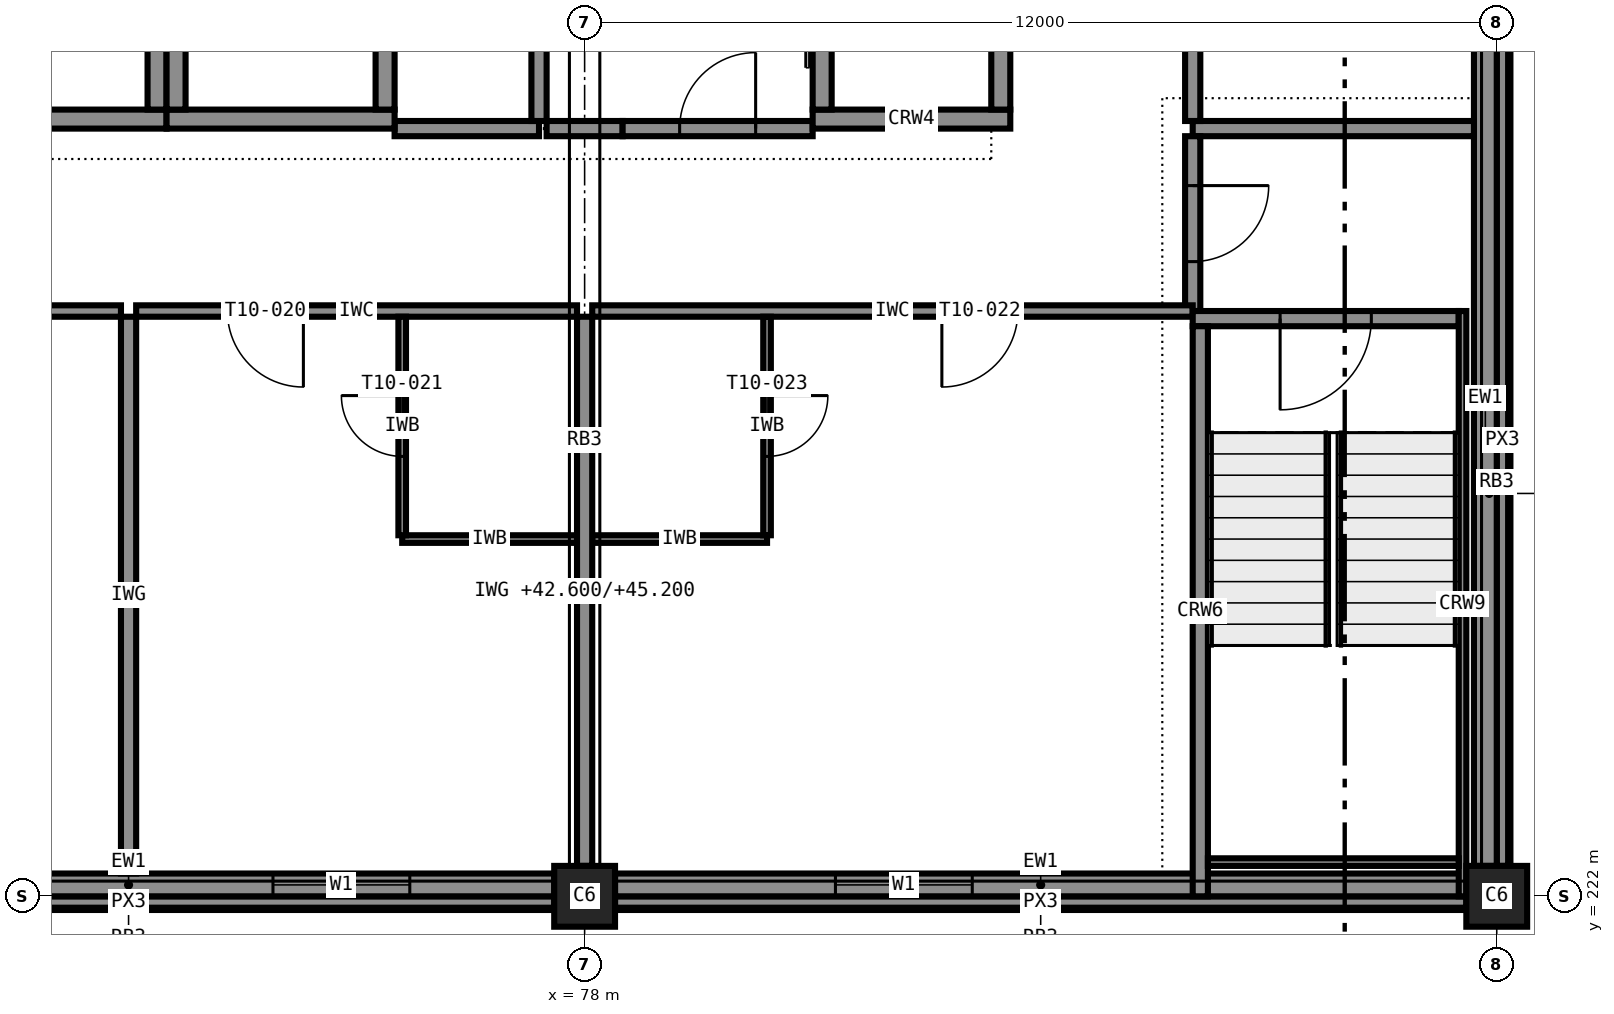
"""IFC4 building model, lengths in metres.
Left out: names, types, materials, properties, quantities, classifications, styles, units other than length and angle.
Written with IfcOpenShell. Run it as: python <this file> out.ifc"""

import sys

from ifc_helpers import new_model, si_unit, direction, frame, frame_2d, origin, origin_2d, place, context, subcontext, project, spatial, rectangle, extrude, element, fill, save


model = new_model("IFC4")
c1 = context("Model", 3, precision=1e-05, world=origin(), true_north=direction((0.0, 1.0)))
c2 = subcontext(c1, "Body", "Model", "MODEL_VIEW")
j1 = project(units=[si_unit("LENGTHUNIT", "METRE"), si_unit("PLANEANGLEUNIT", "RADIAN")], contexts=[c1])
p1 = place(None, origin())
s1 = spatial("IfcSite", under=j1, at=p1, CompositionType="ELEMENT")
p2 = place(p1, origin())
s2 = spatial("IfcBuilding", under=s1, at=p2, CompositionType="ELEMENT")
p3 = place(p2, frame((0.0, 0.0, 42.6)))
s3 = spatial("IfcBuildingStorey", under=s2, at=p3, CompositionType="ELEMENT", Elevation=42.6)
for number, where, z_axis, x_axis in (
    (1, (78.0, 222.0, 0.0), (0.0, 0.0, 1.0), (1.0, 0.0, 0.0)),
    (2, (90.0, 222.0, 0.0), (0.0, 0.0, 1.0), (1.0, 0.0, 0.0)),
):
    element("IfcColumn", number, at=place(p3, frame(where, z_axis=z_axis, x_axis=x_axis)), inside=s3, PredefinedType="COLUMN", context=c2, shape_type="SweptSolid", body=[
        extrude(rectangle(XDim=0.8, YDim=0.8, at=origin_2d()), origin(), (0.0, 0.0, 1.0), 3.6),
    ])
p4 = place(p3, frame((69.5, 232.225, 0.0), z_axis=(0.0, 0.0, 1.0), x_axis=(1.0, 0.0, 0.0)))
e3 = element("IfcWall", 3, at=p4, inside=s3, PredefinedType="SHEAR", context=c2, shape_type="SweptSolid", body=[
    extrude(rectangle(XDim=3.0, YDim=0.25, at=frame_2d((1.5, 0.0))), origin(), (0.0, 0.0, 1.0), 3.6),
])
p5 = place(p3, frame((72.375, 232.35, 0.0), z_axis=(0.0, 0.0, 1.0), x_axis=(0.0, 1.0, 0.0)))
e4 = element("IfcWall", 4, at=p5, inside=s3, PredefinedType="SHEAR", context=c2, shape_type="SweptSolid", body=[
    extrude(rectangle(XDim=3.3, YDim=0.25, at=frame_2d((1.65, 0.0))), origin(), (0.0, 0.0, 1.0), 3.6),
])
p6 = place(p3, frame((72.5, 232.225, 0.0), z_axis=(0.0, 0.0, 1.0), x_axis=(1.0, 0.0, 0.0)))
e5 = element("IfcWall", 5, at=p6, inside=s3, PredefinedType="SHEAR", context=c2, shape_type="SweptSolid", body=[
    extrude(rectangle(XDim=3.0, YDim=0.25, at=frame_2d((1.5, 0.0))), origin(), (0.0, 0.0, 1.0), 3.6),
])
for number, where, z_axis, x_axis in (
    (6, (72.625, 232.35, 0.0), (0.0, 0.0, 1.0), (0.0, 1.0, 0.0)),
    (7, (75.375, 232.35, 0.0), (0.0, 0.0, 1.0), (0.0, 1.0, 0.0)),
):
    element("IfcWall", number, at=place(p3, frame(where, z_axis=z_axis, x_axis=x_axis)), inside=s3, PredefinedType="SHEAR", context=c2, shape_type="SweptSolid", body=[
        extrude(rectangle(XDim=3.3, YDim=0.25, at=frame_2d((1.65, 0.0))), origin(), (0.0, 0.0, 1.0), 3.6),
    ])
p7 = place(p3, frame((81.0, 232.225, 0.0), z_axis=(0.0, 0.0, 1.0), x_axis=(1.0, 0.0, 0.0)))
e8 = element("IfcWall", 8, at=p7, inside=s3, PredefinedType="SHEAR", context=c2, shape_type="SweptSolid", body=[
    extrude(rectangle(XDim=2.6, YDim=0.25, at=frame_2d((1.3, 0.0))), origin(), (0.0, 0.0, 1.0), 3.6),
])
p8 = place(p3, frame((81.125, 232.35, 0.0), z_axis=(0.0, 0.0, 1.0), x_axis=(0.0, 1.0, 0.0)))
e9 = element("IfcWall", 9, at=p8, inside=s3, PredefinedType="SHEAR", context=c2, shape_type="SweptSolid", body=[
    extrude(rectangle(XDim=3.3, YDim=0.25, at=frame_2d((1.65, 0.0))), origin(), (0.0, 0.0, 1.0), 3.6),
])
p9 = place(p8, frame((1.1, 0.0, 0.0)))
e10 = element("IfcOpeningElement", 10, at=p9, cuts=e9, PredefinedType="OPENING", context=c2, shape_type="SweptSolid", body=[
    extrude(rectangle(XDim=1.1, YDim=2.1, at=frame_2d((0.55, 1.05))), frame((0.0, 0.135, 0.0), z_axis=(0.0, -1.0, 0.0), x_axis=(1.0, 0.0, 0.0)), (0.0, 0.0, 1.0), 0.27),
])
p10 = place(p3, frame((83.475, 232.35, 0.0), z_axis=(0.0, 0.0, 1.0), x_axis=(0.0, 1.0, 0.0)))
e11 = element("IfcWall", 11, at=p10, inside=s3, PredefinedType="SHEAR", context=c2, shape_type="SweptSolid", body=[
    extrude(rectangle(XDim=3.3, YDim=0.25, at=frame_2d((1.65, 0.0))), origin(), (0.0, 0.0, 1.0), 3.6),
])
p11 = place(p3, frame((89.5, 229.6, 0.0), z_axis=(0.0, 0.0, 1.0), x_axis=(-1.0, 0.0, 0.0)))
e12 = element("IfcWall", 12, at=p11, inside=s3, PredefinedType="SHEAR", context=c2, shape_type="SweptSolid", body=[
    extrude(rectangle(XDim=3.5, YDim=0.2, at=frame_2d((1.75, 0.0))), origin(), (0.0, 0.0, 1.0), 3.6),
])
p12 = place(p11, frame((1.15, 0.0, 0.0)))
e13 = element("IfcOpeningElement", 13, at=p12, cuts=e12, PredefinedType="OPENING", context=c2, shape_type="SweptSolid", body=[
    extrude(rectangle(XDim=1.2, YDim=2.1, at=frame_2d((0.6, 1.05))), frame((0.0, 0.11, 0.0), z_axis=(0.0, -1.0, 0.0), x_axis=(1.0, 0.0, 0.0)), (0.0, 0.0, 1.0), 0.22),
])
p13 = place(p3, frame((86.1, 222.0, 0.0), z_axis=(0.0, 0.0, 1.0), x_axis=(0.0, 1.0, 0.0)))
e14 = element("IfcWall", 14, at=p13, inside=s3, PredefinedType="SHEAR", context=c2, shape_type="SweptSolid", body=[
    extrude(rectangle(XDim=7.5, YDim=0.2, at=frame_2d((3.75, 0.0))), origin(), (0.0, 0.0, 1.0), 3.6),
])
p14 = place(p3, frame((89.55, 229.7, 0.0), z_axis=(0.0, 0.0, 1.0), x_axis=(0.0, -1.0, 0.0)))
e15 = element("IfcWall", 15, at=p14, inside=s3, PredefinedType="SHEAR", context=c2, shape_type="SweptSolid", body=[
    extrude(rectangle(XDim=7.7, YDim=0.1, at=frame_2d((3.85, 0.0))), origin(), (0.0, 0.0, 1.0), 3.4),
])
p15 = place(p3, frame((89.5, 222.45, 0.0), z_axis=(0.0, 0.0, 1.0), x_axis=(-1.0, 0.0, 0.0)))
e16 = element("IfcWall", 16, at=p15, inside=s3, PredefinedType="SHEAR", context=c2, shape_type="SweptSolid", body=[
    extrude(rectangle(XDim=3.3, YDim=0.1, at=frame_2d((1.65, 0.0))), origin(), (0.0, 0.0, 1.0), 3.4),
])
p16 = place(p3, frame((66.4, 222.15, 0.0), z_axis=(0.0, 0.0, 1.0), x_axis=(1.0, 0.0, 0.0)))
e17 = element("IfcWall", 17, at=p16, inside=s3, PredefinedType="STANDARD", context=c2, shape_type="SweptSolid", body=[
    extrude(rectangle(XDim=11.2, YDim=0.3, at=frame_2d((5.6, 0.0))), origin(), (0.0, 0.0, 1.0), 2.6),
])
p17 = place(p16, frame((1.9, 0.0, 0.85)))
e18 = element("IfcOpeningElement", 18, at=p17, cuts=e17, PredefinedType="OPENING", context=c2, shape_type="SweptSolid", body=[
    extrude(rectangle(XDim=1.8, YDim=1.75, at=frame_2d((0.9, 0.875))), frame((0.0, 0.16, 0.0), z_axis=(0.0, -1.0, 0.0), x_axis=(1.0, 0.0, 0.0)), (0.0, 0.0, 1.0), 0.32),
])
p18 = place(p16, frame((7.5, 0.0, 0.85)))
e19 = element("IfcOpeningElement", 19, at=p18, cuts=e17, PredefinedType="OPENING", context=c2, shape_type="SweptSolid", body=[
    extrude(rectangle(XDim=1.8, YDim=1.75, at=frame_2d((0.9, 0.875))), frame((0.0, 0.16, 0.0), z_axis=(0.0, -1.0, 0.0), x_axis=(1.0, 0.0, 0.0)), (0.0, 0.0, 1.0), 0.32),
])
p19 = place(p3, frame((78.4, 222.15, 0.0), z_axis=(0.0, 0.0, 1.0), x_axis=(1.0, 0.0, 0.0)))
e20 = element("IfcWall", 20, at=p19, inside=s3, PredefinedType="STANDARD", context=c2, shape_type="SweptSolid", body=[
    extrude(rectangle(XDim=11.2, YDim=0.3, at=frame_2d((5.6, 0.0))), origin(), (0.0, 0.0, 1.0), 2.6),
])
p20 = place(p19, frame((2.9, 0.0, 0.85)))
e21 = element("IfcOpeningElement", 21, at=p20, cuts=e20, PredefinedType="OPENING", context=c2, shape_type="SweptSolid", body=[
    extrude(rectangle(XDim=1.8, YDim=1.75, at=frame_2d((0.9, 0.875))), frame((0.0, 0.16, 0.0), z_axis=(0.0, -1.0, 0.0), x_axis=(1.0, 0.0, 0.0)), (0.0, 0.0, 1.0), 0.32),
])
for number, where, z_axis, x_axis in (
    (22, (66.4, 221.925, 3.4), (0.0, 0.0, 1.0), (1.0, 0.0, 0.0)),
    (23, (78.4, 221.925, 3.4), (0.0, 0.0, 1.0), (1.0, 0.0, 0.0)),
):
    element("IfcWall", number, at=place(p3, frame(where, z_axis=z_axis, x_axis=x_axis)), inside=s3, PredefinedType="STANDARD", context=c2, shape_type="SweptSolid", body=[
        extrude(rectangle(XDim=11.2, YDim=0.15, at=frame_2d((5.6, 0.0))), origin(), (0.0, 0.0, 1.0), 0.2),
    ])
p21 = place(p3, frame((89.85, 222.4, 0.0), z_axis=(0.0, 0.0, 1.0), x_axis=(0.0, 1.0, 0.0)))
e24 = element("IfcWall", 24, at=p21, inside=s3, PredefinedType="STANDARD", context=c2, shape_type="SweptSolid", body=[
    extrude(rectangle(XDim=11.2, YDim=0.3, at=frame_2d((5.6, 0.0))), origin(), (0.0, 0.0, 1.0), 2.6),
])
p22 = place(p3, frame((90.075, 222.4, 3.4), z_axis=(0.0, 0.0, 1.0), x_axis=(0.0, 1.0, 0.0)))
e25 = element("IfcWall", 25, at=p22, inside=s3, PredefinedType="STANDARD", context=c2, shape_type="SweptSolid", body=[
    extrude(rectangle(XDim=11.2, YDim=0.15, at=frame_2d((5.6, 0.0))), origin(), (0.0, 0.0, 1.0), 0.2),
])
p23 = place(p3, frame((75.5, 232.1, 0.0), z_axis=(0.0, 0.0, 1.0), x_axis=(1.0, 0.0, 0.0)))
e26 = element("IfcWall", 26, at=p23, inside=s3, PredefinedType="PARTITIONING", context=c2, shape_type="SweptSolid", body=[
    extrude(rectangle(XDim=1.9, YDim=0.2, at=frame_2d((0.95, 0.0))), origin(), (0.0, 0.0, 1.0), 3.4),
])
p24 = place(p3, frame((77.5, 232.1, 0.0), z_axis=(0.0, 0.0, 1.0), x_axis=(1.0, 0.0, 0.0)))
e27 = element("IfcWall", 27, at=p24, inside=s3, PredefinedType="PARTITIONING", context=c2, shape_type="SweptSolid", body=[
    extrude(rectangle(XDim=1.0, YDim=0.2, at=frame_2d((0.5, 0.0))), origin(), (0.0, 0.0, 1.0), 3.4),
])
p25 = place(p3, frame((78.5, 232.1, 0.0), z_axis=(0.0, 0.0, 1.0), x_axis=(1.0, 0.0, 0.0)))
e28 = element("IfcWall", 28, at=p25, inside=s3, PredefinedType="PARTITIONING", context=c2, shape_type="SweptSolid", body=[
    extrude(rectangle(XDim=2.5, YDim=0.2, at=frame_2d((1.25, 0.0))), origin(), (0.0, 0.0, 1.0), 3.4),
])
p26 = place(p25, frame((0.75, 0.0, 0.0)))
e29 = element("IfcOpeningElement", 29, at=p26, cuts=e28, PredefinedType="OPENING", context=c2, shape_type="SweptSolid", body=[
    extrude(rectangle(XDim=1.0, YDim=2.1, at=frame_2d((0.5, 1.05))), frame((0.0, 0.11, 0.0), z_axis=(0.0, -1.0, 0.0), x_axis=(1.0, 0.0, 0.0)), (0.0, 0.0, 1.0), 0.22),
])
p27 = place(p3, frame((86.0, 232.1, 0.0), z_axis=(0.0, 0.0, 1.0), x_axis=(1.0, 0.0, 0.0)))
e30 = element("IfcWall", 30, at=p27, inside=s3, PredefinedType="PARTITIONING", context=c2, shape_type="SweptSolid", body=[
    extrude(rectangle(XDim=3.7, YDim=0.2, at=frame_2d((1.85, 0.0))), origin(), (0.0, 0.0, 1.0), 3.4),
])
p28 = place(p3, frame((77.4, 232.2, 0.0), z_axis=(0.0, 0.0, 1.0), x_axis=(0.0, 1.0, 0.0)))
e31 = element("IfcWall", 31, at=p28, inside=s3, PredefinedType="PARTITIONING", context=c2, shape_type="SweptSolid", body=[
    extrude(rectangle(XDim=3.6, YDim=0.2, at=frame_2d((1.8, 0.0))), origin(), (0.0, 0.0, 1.0), 3.4),
])
p29 = place(p3, frame((86.0, 235.8, 0.0), z_axis=(0.0, 0.0, 1.0), x_axis=(0.0, -1.0, 0.0)))
e32 = element("IfcWall", 32, at=p29, inside=s3, PredefinedType="PARTITIONING", context=c2, shape_type="SweptSolid", body=[
    extrude(rectangle(XDim=3.6, YDim=0.2, at=frame_2d((1.8, 0.0))), origin(), (0.0, 0.0, 1.0), 3.4),
])
p30 = place(p29, frame((1.35, 0.0, 0.0)))
e33 = element("IfcOpeningElement", 33, at=p30, cuts=e32, PredefinedType="OPENING", context=c2, shape_type="SweptSolid", body=[
    extrude(rectangle(XDim=0.9, YDim=2.1, at=frame_2d((0.45, 1.05))), frame((0.0, 0.11, 0.0), z_axis=(0.0, -1.0, 0.0), x_axis=(1.0, 0.0, 0.0)), (0.0, 0.0, 1.0), 0.22),
])
p31 = place(p3, frame((86.0, 232.0, 0.0), z_axis=(0.0, 0.0, 1.0), x_axis=(0.0, -1.0, 0.0)))
e34 = element("IfcWall", 34, at=p31, inside=s3, PredefinedType="PARTITIONING", context=c2, shape_type="SweptSolid", body=[
    extrude(rectangle(XDim=2.3, YDim=0.2, at=frame_2d((1.15, 0.0))), origin(), (0.0, 0.0, 1.0), 3.4),
])
p32 = place(p31, frame((0.65, 0.0, 0.0)))
e35 = element("IfcOpeningElement", 35, at=p32, cuts=e34, PredefinedType="OPENING", context=c2, shape_type="SweptSolid", body=[
    extrude(rectangle(XDim=1.0, YDim=2.1, at=frame_2d((0.5, 1.05))), frame((0.0, 0.11, 0.0), z_axis=(0.0, -1.0, 0.0), x_axis=(1.0, 0.0, 0.0)), (0.0, 0.0, 1.0), 0.22),
])
p33 = place(p3, frame((71.9, 229.7, 0.0), z_axis=(0.0, 0.0, 1.0), x_axis=(-1.0, 0.0, 0.0)))
e36 = element("IfcWall", 36, at=p33, inside=s3, PredefinedType="PARTITIONING", context=c2, shape_type="SweptSolid", body=[
    extrude(rectangle(XDim=5.8, YDim=0.15, at=frame_2d((2.9, 0.0))), origin(), (0.0, 0.0, 1.0), 3.4),
])
p34 = place(p33, frame((1.2, 0.0, 0.0)))
e37 = element("IfcOpeningElement", 37, at=p34, cuts=e36, PredefinedType="OPENING", context=c2, shape_type="SweptSolid", body=[
    extrude(rectangle(XDim=1.0, YDim=2.1, at=frame_2d((0.5, 1.05))), frame((0.0, 0.085, 0.0), z_axis=(0.0, -1.0, 0.0), x_axis=(1.0, 0.0, 0.0)), (0.0, 0.0, 1.0), 0.17),
])
p35 = place(p3, frame((77.9, 229.7, 0.0), z_axis=(0.0, 0.0, 1.0), x_axis=(-1.0, 0.0, 0.0)))
e38 = element("IfcWall", 38, at=p35, inside=s3, PredefinedType="PARTITIONING", context=c2, shape_type="SweptSolid", body=[
    extrude(rectangle(XDim=5.8, YDim=0.15, at=frame_2d((2.9, 0.0))), origin(), (0.0, 0.0, 1.0), 3.4),
])
p36 = place(p35, frame((3.6, 0.0, 0.0)))
e39 = element("IfcOpeningElement", 39, at=p36, cuts=e38, PredefinedType="OPENING", context=c2, shape_type="SweptSolid", body=[
    extrude(rectangle(XDim=1.0, YDim=2.1, at=frame_2d((0.5, 1.05))), frame((0.0, 0.085, 0.0), z_axis=(0.0, -1.0, 0.0), x_axis=(1.0, 0.0, 0.0)), (0.0, 0.0, 1.0), 0.17),
])
p37 = place(p3, frame((75.6, 226.7, 0.0), z_axis=(0.0, 0.0, 1.0), x_axis=(1.0, 0.0, 0.0)))
e40 = element("IfcWall", 40, at=p37, inside=s3, PredefinedType="PARTITIONING", context=c2, shape_type="SweptSolid", body=[
    extrude(rectangle(XDim=2.3, YDim=0.1, at=frame_2d((1.15, 0.0))), origin(), (0.0, 0.0, 1.0), 3.4),
])
p38 = place(p3, frame((75.6, 226.75, 0.0), z_axis=(0.0, 0.0, 1.0), x_axis=(0.0, 1.0, 0.0)))
e41 = element("IfcWall", 41, at=p38, inside=s3, PredefinedType="PARTITIONING", context=c2, shape_type="SweptSolid", body=[
    extrude(rectangle(XDim=2.875, YDim=0.1, at=frame_2d((1.438, 0.0))), origin(), (0.0, 0.0, 1.0), 3.4),
])
p39 = place(p38, frame((1.038, 0.0, 0.0)))
e42 = element("IfcOpeningElement", 42, at=p39, cuts=e41, PredefinedType="OPENING", context=c2, shape_type="SweptSolid", body=[
    extrude(rectangle(XDim=0.8, YDim=2.1, at=frame_2d((0.4, 1.05))), frame((0.0, 0.06, 0.0), z_axis=(0.0, -1.0, 0.0), x_axis=(1.0, 0.0, 0.0)), (0.0, 0.0, 1.0), 0.12),
])
p40 = place(p3, frame((86.0, 229.7, 0.0), z_axis=(0.0, 0.0, 1.0), x_axis=(-1.0, 0.0, 0.0)))
e43 = element("IfcWall", 43, at=p40, inside=s3, PredefinedType="PARTITIONING", context=c2, shape_type="SweptSolid", body=[
    extrude(rectangle(XDim=7.9, YDim=0.15, at=frame_2d((3.95, 0.0))), origin(), (0.0, 0.0, 1.0), 3.4),
])
p41 = place(p40, frame((2.3, 0.0, 0.0)))
e44 = element("IfcOpeningElement", 44, at=p41, cuts=e43, PredefinedType="OPENING", context=c2, shape_type="SweptSolid", body=[
    extrude(rectangle(XDim=1.0, YDim=2.1, at=frame_2d((0.5, 1.05))), frame((0.0, 0.085, 0.0), z_axis=(0.0, -1.0, 0.0), x_axis=(1.0, 0.0, 0.0)), (0.0, 0.0, 1.0), 0.17),
])
p42 = place(p3, frame((78.1, 226.7, 0.0), z_axis=(0.0, 0.0, 1.0), x_axis=(1.0, 0.0, 0.0)))
e45 = element("IfcWall", 45, at=p42, inside=s3, PredefinedType="PARTITIONING", context=c2, shape_type="SweptSolid", body=[
    extrude(rectangle(XDim=2.3, YDim=0.1, at=frame_2d((1.15, 0.0))), origin(), (0.0, 0.0, 1.0), 3.4),
])
p43 = place(p3, frame((80.4, 229.625, 0.0), z_axis=(0.0, 0.0, 1.0), x_axis=(0.0, -1.0, 0.0)))
e46 = element("IfcWall", 46, at=p43, inside=s3, PredefinedType="PARTITIONING", context=c2, shape_type="SweptSolid", body=[
    extrude(rectangle(XDim=2.875, YDim=0.1, at=frame_2d((1.438, 0.0))), origin(), (0.0, 0.0, 1.0), 3.4),
])
p44 = place(p43, frame((1.038, 0.0, 0.0)))
e47 = element("IfcOpeningElement", 47, at=p44, cuts=e46, PredefinedType="OPENING", context=c2, shape_type="SweptSolid", body=[
    extrude(rectangle(XDim=0.8, YDim=2.1, at=frame_2d((0.4, 1.05))), frame((0.0, 0.06, 0.0), z_axis=(0.0, -1.0, 0.0), x_axis=(1.0, 0.0, 0.0)), (0.0, 0.0, 1.0), 0.12),
])
p45 = place(p3, frame((72.0, 222.3, 0.0), z_axis=(0.0, 0.0, 1.0), x_axis=(0.0, 1.0, 0.0)))
e48 = element("IfcWall", 48, at=p45, inside=s3, PredefinedType="PARTITIONING", context=c2, shape_type="SweptSolid", body=[
    extrude(rectangle(XDim=7.325, YDim=0.2, at=frame_2d((3.663, 0.0))), origin(), (0.0, 0.0, 1.0), 3.4),
])
p46 = place(p3, frame((78.0, 222.4, 0.0), z_axis=(0.0, 0.0, 1.0), x_axis=(0.0, 1.0, 0.0)))
e49 = element("IfcWall", 49, at=p46, inside=s3, PredefinedType="PARTITIONING", context=c2, shape_type="SweptSolid", body=[
    extrude(rectangle(XDim=7.225, YDim=0.2, at=frame_2d((3.613, 0.0))), origin(), (0.0, 0.0, 1.0), 2.6),
])
p47 = place(p18, origin())
e50 = element("IfcWindow", 50, at=p47, inside=s3, PartitioningType="SINGLE_PANEL", PredefinedType="WINDOW", context=c2, shape_type="SweptSolid", body=[
    extrude(rectangle(XDim=1.8, YDim=1.75, at=frame_2d((0.9, 0.875))), frame((0.0, 0.03, 0.0), z_axis=(0.0, -1.0, 0.0), x_axis=(1.0, 0.0, 0.0)), (0.0, 0.0, 1.0), 0.06),
])
fill(e19, e50)
p48 = place(p20, origin())
e51 = element("IfcWindow", 51, at=p48, inside=s3, PartitioningType="SINGLE_PANEL", PredefinedType="WINDOW", context=c2, shape_type="SweptSolid", body=[
    extrude(rectangle(XDim=1.8, YDim=1.75, at=frame_2d((0.9, 0.875))), frame((0.0, 0.03, 0.0), z_axis=(0.0, -1.0, 0.0), x_axis=(1.0, 0.0, 0.0)), (0.0, 0.0, 1.0), 0.06),
])
fill(e21, e51)
p49 = place(p26, origin())
e52 = element("IfcDoor", 52, at=p49, inside=s3, OperationType="SINGLE_SWING_RIGHT", PredefinedType="DOOR", context=c2, shape_type="SweptSolid", body=[
    extrude(rectangle(XDim=1.0, YDim=2.1, at=frame_2d((0.5, 1.05))), frame((0.0, 0.025, 0.0), z_axis=(0.0, -1.0, 0.0), x_axis=(1.0, 0.0, 0.0)), (0.0, 0.0, 1.0), 0.05),
])
fill(e29, e52)
p50 = place(p32, origin())
e53 = element("IfcDoor", 53, at=p50, inside=s3, OperationType="SINGLE_SWING_LEFT", PredefinedType="DOOR", context=c2, shape_type="SweptSolid", body=[
    extrude(rectangle(XDim=1.0, YDim=2.1, at=frame_2d((0.5, 1.05))), frame((0.0, 0.025, 0.0), z_axis=(0.0, -1.0, 0.0), x_axis=(1.0, 0.0, 0.0)), (0.0, 0.0, 1.0), 0.05),
])
fill(e35, e53)
p51 = place(p36, origin())
e54 = element("IfcDoor", 54, at=p51, inside=s3, OperationType="SINGLE_SWING_LEFT", PredefinedType="DOOR", context=c2, shape_type="SweptSolid", body=[
    extrude(rectangle(XDim=1.0, YDim=2.1, at=frame_2d((0.5, 1.05))), frame((0.0, 0.025, 0.0), z_axis=(0.0, -1.0, 0.0), x_axis=(1.0, 0.0, 0.0)), (0.0, 0.0, 1.0), 0.05),
])
fill(e39, e54)
p52 = place(p39, origin())
e55 = element("IfcDoor", 55, at=p52, inside=s3, OperationType="SINGLE_SWING_RIGHT", PredefinedType="DOOR", context=c2, shape_type="SweptSolid", body=[
    extrude(rectangle(XDim=0.8, YDim=2.1, at=frame_2d((0.4, 1.05))), frame((0.0, 0.025, 0.0), z_axis=(0.0, -1.0, 0.0), x_axis=(1.0, 0.0, 0.0)), (0.0, 0.0, 1.0), 0.05),
])
fill(e42, e55)
p53 = place(p41, origin())
e56 = element("IfcDoor", 56, at=p53, inside=s3, OperationType="SINGLE_SWING_RIGHT", PredefinedType="DOOR", context=c2, shape_type="SweptSolid", body=[
    extrude(rectangle(XDim=1.0, YDim=2.1, at=frame_2d((0.5, 1.05))), frame((0.0, 0.025, 0.0), z_axis=(0.0, -1.0, 0.0), x_axis=(1.0, 0.0, 0.0)), (0.0, 0.0, 1.0), 0.05),
])
fill(e44, e56)
p54 = place(p44, origin())
e57 = element("IfcDoor", 57, at=p54, inside=s3, OperationType="SINGLE_SWING_LEFT", PredefinedType="DOOR", context=c2, shape_type="SweptSolid", body=[
    extrude(rectangle(XDim=0.8, YDim=2.1, at=frame_2d((0.4, 1.05))), frame((0.0, 0.025, 0.0), z_axis=(0.0, -1.0, 0.0), x_axis=(1.0, 0.0, 0.0)), (0.0, 0.0, 1.0), 0.05),
])
fill(e47, e57)
p55 = place(p12, origin())
e58 = element("IfcDoor", 58, at=p55, inside=s3, OperationType="SINGLE_SWING_RIGHT", PredefinedType="DOOR", context=c2, shape_type="SweptSolid", body=[
    extrude(rectangle(XDim=1.2, YDim=2.1, at=frame_2d((0.6, 1.05))), frame((0.0, 0.025, 0.0), z_axis=(0.0, -1.0, 0.0), x_axis=(1.0, 0.0, 0.0)), (0.0, 0.0, 1.0), 0.05),
])
fill(e13, e58)
save(model, sys.argv[1])
